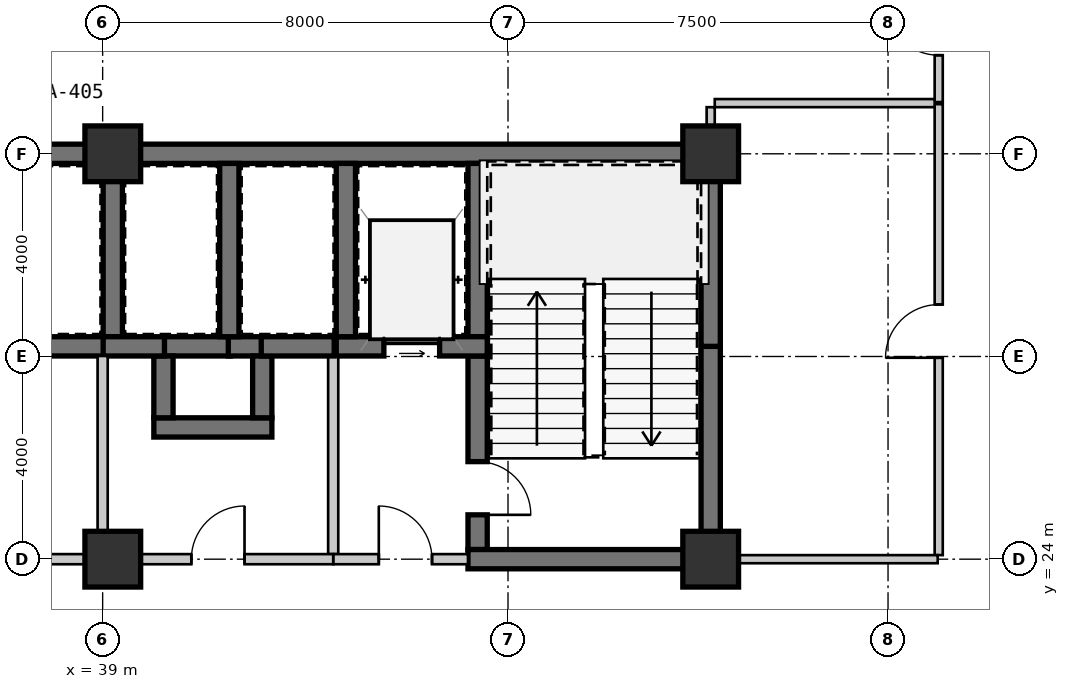
"""IFC4 building model, lengths in metres.
Left out: names, types, materials, properties, quantities, classifications, styles, units other than length and angle.
Written with IfcOpenShell. Run it as: python <this file> out.ifc"""

import sys

from ifc_helpers import new_model, si_unit, direction, frame, frame_2d, origin, origin_2d, place, context, subcontext, project, spatial, rectangle, extrude, source, transform, mapped, element, fill, save


model = new_model("IFC4")
c1 = context("Model", 3, precision=1e-05, world=origin(), true_north=direction((0.0, 1.0)))
c2 = subcontext(c1, "Body", "Model", "MODEL_VIEW")
j1 = project(units=[si_unit("LENGTHUNIT", "METRE"), si_unit("PLANEANGLEUNIT", "RADIAN")], contexts=[c1])
p1 = place(None, origin())
s1 = spatial("IfcSite", under=j1, at=p1, CompositionType="ELEMENT")
p2 = place(p1, origin())
s2 = spatial("IfcBuilding", under=s1, at=p2, CompositionType="ELEMENT")
p3 = place(p2, frame((0.0, 0.0, 8.4)))
s3 = spatial("IfcBuildingStorey", under=s2, at=p3, CompositionType="ELEMENT", Elevation=8.4)
m1 = source(origin(), c2, "Body", "SweptSolid", [
    extrude(rectangle(XDim=1.1, YDim=1.1, at=origin_2d()), origin(), (0.0, 0.0, 1.0), 4.55),
])
for number, where, z_axis, x_axis in (
    (1, (39.2, 24.0, 0.0), (0.0, 0.0, 1.0), (1.0, 0.0, 0.0)),
    (2, (51.0, 24.0, 0.0), (0.0, 0.0, 1.0), (1.0, 0.0, 0.0)),
    (3, (39.2, 32.0, 0.0), (0.0, 0.0, 1.0), (1.0, 0.0, 0.0)),
    (4, (51.0, 32.0, 0.0), (0.0, 0.0, 1.0), (1.0, 0.0, 0.0)),
):
    element("IfcColumn", number, at=place(p3, frame(where, z_axis=z_axis, x_axis=x_axis)), inside=s3, PredefinedType="COLUMN", context=c2, shape_type="MappedRepresentation", body=[
        mapped(m1, transform((0.0, 0.0, 0.0), scale=1.0)),
    ])
m2 = source(origin(), c2, "Body", "SweptSolid", [
    extrude(rectangle(XDim=11.2, YDim=0.38, at=frame_2d((5.6, 0.0))), origin(), (0.0, 0.0, 1.0), 4.29),
])
p4 = place(p3, frame((28.0, 32.0, 0.0), z_axis=(0.0, 0.0, 1.0), x_axis=(1.0, 0.0, 0.0)))
e5 = element("IfcWall", 5, at=p4, inside=s3, PredefinedType="SHEAR", context=c2, shape_type="MappedRepresentation", body=[
    mapped(m2, transform((0.0, 0.0, 0.0), scale=1.0)),
])
m3 = source(origin(), c2, "Body", "SweptSolid", [
    extrude(rectangle(XDim=11.99, YDim=0.38, at=frame_2d((5.995, 0.0))), origin(), (0.0, 0.0, 1.0), 4.29),
])
p5 = place(p3, frame((39.2, 32.0, 0.0), z_axis=(0.0, 0.0, 1.0), x_axis=(1.0, 0.0, 0.0)))
e6 = element("IfcWall", 6, at=p5, inside=s3, PredefinedType="SHEAR", context=c2, shape_type="MappedRepresentation", body=[
    mapped(m3, transform((0.0, 0.0, 0.0), scale=1.0)),
])
m4 = source(origin(), c2, "Body", "SweptSolid", [
    extrude(rectangle(XDim=4.01, YDim=0.38, at=frame_2d((2.005, 0.0))), origin(), (0.0, 0.0, 1.0), 4.29),
])
p6 = place(p3, frame((51.0, 24.19, 0.0), z_axis=(0.0, 0.0, 1.0), x_axis=(0.0, 1.0, 0.0)))
e7 = element("IfcWall", 7, at=p6, inside=s3, PredefinedType="SHEAR", context=c2, shape_type="MappedRepresentation", body=[
    mapped(m4, transform((0.0, 0.0, 0.0), scale=1.0)),
])
m5 = source(origin(), c2, "Body", "SweptSolid", [
    extrude(rectangle(XDim=3.61, YDim=0.38, at=frame_2d((1.805, 0.0))), origin(), (0.0, 0.0, 1.0), 4.29),
])
p7 = place(p3, frame((51.0, 28.2, 0.0), z_axis=(0.0, 0.0, 1.0), x_axis=(0.0, 1.0, 0.0)))
e8 = element("IfcWall", 8, at=p7, inside=s3, PredefinedType="SHEAR", context=c2, shape_type="MappedRepresentation", body=[
    mapped(m5, transform((0.0, 0.0, 0.0), scale=1.0)),
])
m6 = source(origin(), c2, "Body", "SweptSolid", [
    extrude(rectangle(XDim=3.42, YDim=0.38, at=frame_2d((1.71, 0.0))), origin(), (0.0, 0.0, 1.0), 4.29),
])
p8 = place(p3, frame((46.4, 31.81, 0.0), z_axis=(0.0, 0.0, 1.0), x_axis=(0.0, -1.0, 0.0)))
e9 = element("IfcWall", 9, at=p8, inside=s3, PredefinedType="SHEAR", context=c2, shape_type="MappedRepresentation", body=[
    mapped(m6, transform((0.0, 0.0, 0.0), scale=1.0)),
])
m7 = source(origin(), c2, "Body", "SweptSolid", [
    extrude(rectangle(XDim=3.82, YDim=0.38, at=frame_2d((1.91, 0.0))), origin(), (0.0, 0.0, 1.0), 4.29),
])
p9 = place(p3, frame((46.4, 28.01, 0.0), z_axis=(0.0, 0.0, 1.0), x_axis=(0.0, -1.0, 0.0)))
e10 = element("IfcWall", 10, at=p9, inside=s3, PredefinedType="SHEAR", context=c2, shape_type="MappedRepresentation", body=[
    mapped(m7, transform((0.0, 0.0, 0.0), scale=1.0)),
])
m8 = source(origin(), c2, "Body", "SweptSolid", [
    extrude(rectangle(XDim=1.05, YDim=2.1, at=frame_2d((0.525, 1.05))), frame((0.0, 0.2, 0.0), z_axis=(0.0, -1.0, 0.0), x_axis=(1.0, 0.0, 0.0)), (0.0, 0.0, 1.0), 0.4),
])
p10 = place(p9, frame((2.085, 0.0, 0.0)))
e11 = element("IfcOpeningElement", 11, at=p10, cuts=e10, PredefinedType="OPENING", context=c2, shape_type="MappedRepresentation", body=[
    mapped(m8, transform((0.0, 0.0, 0.0), scale=1.0)),
])
m9 = source(origin(), c2, "Body", "SweptSolid", [
    extrude(rectangle(XDim=4.98, YDim=0.38, at=frame_2d((2.49, 0.0))), origin(), (0.0, 0.0, 1.0), 4.29),
])
p11 = place(p3, frame((46.21, 24.0, 0.0), z_axis=(0.0, 0.0, 1.0), x_axis=(1.0, 0.0, 0.0)))
e12 = element("IfcWall", 12, at=p11, inside=s3, PredefinedType="SHEAR", context=c2, shape_type="MappedRepresentation", body=[
    mapped(m9, transform((0.0, 0.0, 0.0), scale=1.0)),
])
m10 = source(origin(), c2, "Body", "SweptSolid", [
    extrude(rectangle(XDim=2.98, YDim=0.38, at=frame_2d((1.49, 0.0))), origin(), (0.0, 0.0, 1.0), 4.29),
])
p12 = place(p3, frame((43.61, 28.2, 0.0), z_axis=(0.0, 0.0, 1.0), x_axis=(1.0, 0.0, 0.0)))
e13 = element("IfcWall", 13, at=p12, inside=s3, PredefinedType="SHEAR", context=c2, shape_type="MappedRepresentation", body=[
    mapped(m10, transform((0.0, 0.0, 0.0), scale=1.0)),
])
m11 = source(origin(), c2, "Body", "SweptSolid", [
    extrude(rectangle(XDim=1.1, YDim=2.15, at=frame_2d((0.55, 1.075))), frame((0.0, 0.2, 0.0), z_axis=(0.0, -1.0, 0.0), x_axis=(1.0, 0.0, 0.0)), (0.0, 0.0, 1.0), 0.4),
])
p13 = place(p12, frame((0.94, 0.0, 0.0)))
e14 = element("IfcOpeningElement", 14, at=p13, cuts=e13, PredefinedType="OPENING", context=c2, shape_type="MappedRepresentation", body=[
    mapped(m11, transform((0.0, 0.0, 0.0), scale=1.0)),
])
p14 = place(p3, frame((43.8, 31.81, 0.0), z_axis=(0.0, 0.0, 1.0), x_axis=(0.0, -1.0, 0.0)))
e15 = element("IfcWall", 15, at=p14, inside=s3, PredefinedType="SHEAR", context=c2, shape_type="MappedRepresentation", body=[
    mapped(m6, transform((0.0, 0.0, 0.0), scale=1.0)),
])
m12 = source(origin(), c2, "Body", "SweptSolid", [
    extrude(rectangle(XDim=3.91, YDim=0.2, at=frame_2d((1.955, 0.0))), origin(), (0.0, 0.0, 1.0), 4.29),
])
p15 = place(p3, frame((43.55, 28.01, 0.0), z_axis=(0.0, 0.0, 1.0), x_axis=(0.0, -1.0, 0.0)))
e16 = element("IfcWall", 16, at=p15, inside=s3, PredefinedType="SOLIDWALL", context=c2, shape_type="MappedRepresentation", body=[
    mapped(m12, transform((0.0, 0.0, 0.0), scale=1.0)),
])
m13 = source(origin(), c2, "Body", "SweptSolid", [
    extrude(rectangle(XDim=2.66, YDim=0.2, at=frame_2d((1.33, 0.0))), origin(), (0.0, 0.0, 1.0), 3.757),
])
p16 = place(p3, frame((43.55, 24.0, 0.0), z_axis=(0.0, 0.0, 1.0), x_axis=(1.0, 0.0, 0.0)))
e17 = element("IfcWall", 17, at=p16, inside=s3, PredefinedType="SOLIDWALL", context=c2, shape_type="MappedRepresentation", body=[
    mapped(m13, transform((0.0, 0.0, 0.0), scale=1.0)),
])
m14 = source(origin(), c2, "Body", "SweptSolid", [
    extrude(rectangle(XDim=1.05, YDim=2.1, at=frame_2d((0.525, 1.05))), frame((0.0, 0.11, 0.0), z_axis=(0.0, -1.0, 0.0), x_axis=(1.0, 0.0, 0.0)), (0.0, 0.0, 1.0), 0.22),
])
p17 = place(p16, frame((0.9, 0.0, 0.0)))
e18 = element("IfcOpeningElement", 18, at=p17, cuts=e17, PredefinedType="OPENING", context=c2, shape_type="MappedRepresentation", body=[
    mapped(m14, transform((0.0, 0.0, 0.0), scale=1.0)),
])
m15 = source(origin(), c2, "Body", "SweptSolid", [
    extrude(rectangle(XDim=1.32, YDim=0.38, at=frame_2d((0.66, 0.0))), origin(), (0.0, 0.0, 1.0), 4.29),
])
p18 = place(p3, frame((41.52, 28.2, 0.0), z_axis=(0.0, 0.0, 1.0), x_axis=(-1.0, 0.0, 0.0)))
e19 = element("IfcWall", 19, at=p18, inside=s3, PredefinedType="SHEAR", context=c2, shape_type="MappedRepresentation", body=[
    mapped(m15, transform((0.0, 0.0, 0.0), scale=1.0)),
])
m16 = source(origin(), c2, "Body", "SweptSolid", [
    extrude(rectangle(XDim=0.67, YDim=0.38, at=frame_2d((0.335, 0.0))), origin(), (0.0, 0.0, 1.0), 4.29),
])
p19 = place(p3, frame((42.15, 28.2, 0.0), z_axis=(0.0, 0.0, 1.0), x_axis=(-1.0, 0.0, 0.0)))
e20 = element("IfcWall", 20, at=p19, inside=s3, PredefinedType="SHEAR", context=c2, shape_type="MappedRepresentation", body=[
    mapped(m16, transform((0.0, 0.0, 0.0), scale=1.0)),
])
m17 = source(origin(), c2, "Body", "SweptSolid", [
    extrude(rectangle(XDim=2.33, YDim=0.38, at=frame_2d((1.165, 0.0))), origin(), (0.0, 0.0, 1.0), 4.29),
])
p20 = place(p3, frame((40.01, 26.6, 0.0), z_axis=(0.0, 0.0, 1.0), x_axis=(1.0, 0.0, 0.0)))
e21 = element("IfcWall", 21, at=p20, inside=s3, PredefinedType="SHEAR", context=c2, shape_type="MappedRepresentation", body=[
    mapped(m17, transform((0.0, 0.0, 0.0), scale=1.0)),
])
m18 = source(origin(), c2, "Body", "SweptSolid", [
    extrude(rectangle(XDim=1.22, YDim=0.38, at=frame_2d((0.61, 0.0))), origin(), (0.0, 0.0, 1.0), 4.29),
])
for number, where, z_axis, x_axis in (
    (22, (40.2, 28.01, 0.0), (0.0, 0.0, 1.0), (0.0, -1.0, 0.0)),
    (23, (42.15, 26.79, 0.0), (0.0, 0.0, 1.0), (0.0, 1.0, 0.0)),
):
    element("IfcWall", number, at=place(p3, frame(where, z_axis=z_axis, x_axis=x_axis)), inside=s3, PredefinedType="SHEAR", context=c2, shape_type="MappedRepresentation", body=[
        mapped(m18, transform((0.0, 0.0, 0.0), scale=1.0)),
    ])
p21 = place(p3, frame((39.2, 28.39, 0.0), z_axis=(0.0, 0.0, 1.0), x_axis=(0.0, 1.0, 0.0)))
e24 = element("IfcWall", 24, at=p21, inside=s3, PredefinedType="SHEAR", context=c2, shape_type="MappedRepresentation", body=[
    mapped(m6, transform((0.0, 0.0, 0.0), scale=1.0)),
])
m19 = source(origin(), c2, "Body", "SweptSolid", [
    extrude(rectangle(XDim=2.36, YDim=0.38, at=frame_2d((1.18, 0.0))), origin(), (0.0, 0.0, 1.0), 4.29),
])
p22 = place(p3, frame((36.66, 28.2, 0.0), z_axis=(0.0, 0.0, 1.0), x_axis=(1.0, 0.0, 0.0)))
e25 = element("IfcWall", 25, at=p22, inside=s3, PredefinedType="SHEAR", context=c2, shape_type="MappedRepresentation", body=[
    mapped(m19, transform((0.0, 0.0, 0.0), scale=1.0)),
])
p23 = place(p3, frame((41.5, 28.39, 0.0), z_axis=(0.0, 0.0, 1.0), x_axis=(0.0, 1.0, 0.0)))
e26 = element("IfcWall", 26, at=p23, inside=s3, PredefinedType="SHEAR", context=c2, shape_type="MappedRepresentation", body=[
    mapped(m6, transform((0.0, 0.0, 0.0), scale=1.0)),
])
m20 = source(origin(), c2, "Body", "SweptSolid", [
    extrude(rectangle(XDim=1.21, YDim=0.38, at=frame_2d((0.605, 0.0))), origin(), (0.0, 0.0, 1.0), 4.29),
])
p24 = place(p3, frame((39.01, 28.2, 0.0), z_axis=(0.0, 0.0, 1.0), x_axis=(1.0, 0.0, 0.0)))
e27 = element("IfcWall", 27, at=p24, inside=s3, PredefinedType="SHEAR", context=c2, shape_type="MappedRepresentation", body=[
    mapped(m20, transform((0.0, 0.0, 0.0), scale=1.0)),
])
m21 = source(origin(), c2, "Body", "SweptSolid", [
    extrude(rectangle(XDim=1.44, YDim=0.38, at=frame_2d((0.72, 0.0))), origin(), (0.0, 0.0, 1.0), 4.29),
])
p25 = place(p3, frame((42.13, 28.2, 0.0), z_axis=(0.0, 0.0, 1.0), x_axis=(1.0, 0.0, 0.0)))
e28 = element("IfcWall", 28, at=p25, inside=s3, PredefinedType="SHEAR", context=c2, shape_type="MappedRepresentation", body=[
    mapped(m21, transform((0.0, 0.0, 0.0), scale=1.0)),
])
p26 = place(p3, frame((39.0, 28.01, 0.0), z_axis=(0.0, 0.0, 1.0), x_axis=(0.0, -1.0, 0.0)))
e29 = element("IfcWall", 29, at=p26, inside=s3, PredefinedType="SOLIDWALL", context=c2, shape_type="MappedRepresentation", body=[
    mapped(m12, transform((0.0, 0.0, 0.0), scale=1.0)),
])
m22 = source(origin(), c2, "Body", "SweptSolid", [
    extrude(rectangle(XDim=3.85, YDim=0.2, at=frame_2d((1.925, 0.0))), origin(), (0.0, 0.0, 1.0), 3.83),
])
p27 = place(p3, frame((39.0, 24.0, 0.0), z_axis=(0.0, 0.0, 1.0), x_axis=(-1.0, 0.0, 0.0)))
e30 = element("IfcWall", 30, at=p27, inside=s3, PredefinedType="SOLIDWALL", context=c2, shape_type="MappedRepresentation", body=[
    mapped(m22, transform((0.0, 0.0, 0.0), scale=1.0)),
])
p28 = place(p27, frame((1.4, 0.0, 0.0)))
e31 = element("IfcOpeningElement", 31, at=p28, cuts=e30, PredefinedType="OPENING", context=c2, shape_type="MappedRepresentation", body=[
    mapped(m14, transform((0.0, 0.0, 0.0), scale=1.0)),
])
m23 = source(origin(), c2, "Body", "SweptSolid", [
    extrude(rectangle(XDim=4.55, YDim=0.2, at=frame_2d((2.275, 0.0))), origin(), (0.0, 0.0, 1.0), 3.757),
])
p29 = place(p3, frame((43.55, 24.0, 0.0), z_axis=(0.0, 0.0, 1.0), x_axis=(-1.0, 0.0, 0.0)))
e32 = element("IfcWall", 32, at=p29, inside=s3, PredefinedType="SOLIDWALL", context=c2, shape_type="MappedRepresentation", body=[
    mapped(m23, transform((0.0, 0.0, 0.0), scale=1.0)),
])
p30 = place(p29, frame((1.75, 0.0, 0.0)))
e33 = element("IfcOpeningElement", 33, at=p30, cuts=e32, PredefinedType="OPENING", context=c2, shape_type="MappedRepresentation", body=[
    mapped(m14, transform((0.0, 0.0, 0.0), scale=1.0)),
])
m24 = source(origin(), c2, "Body", "SweptSolid", [
    extrude(rectangle(XDim=8.9, YDim=0.16, at=frame_2d((4.45, 0.0))), origin(), (0.0, 0.0, 1.0), 4.29),
])
p31 = place(p3, frame((55.5, 24.08, 0.0), z_axis=(0.0, 0.0, 1.0), x_axis=(0.0, 1.0, 0.0)))
e34 = element("IfcWall", 34, at=p31, inside=s3, PredefinedType="PARTITIONING", context=c2, shape_type="MappedRepresentation", body=[
    mapped(m24, transform((0.0, 0.0, 0.0), scale=1.0)),
])
m25 = source(origin(), c2, "Body", "SweptSolid", [
    extrude(rectangle(XDim=1.05, YDim=2.1, at=frame_2d((0.525, 1.05))), frame((0.0, 0.09, 0.0), z_axis=(0.0, -1.0, 0.0), x_axis=(1.0, 0.0, 0.0)), (0.0, 0.0, 1.0), 0.18),
])
p32 = place(p31, frame((3.895, 0.0, 0.0)))
e35 = element("IfcOpeningElement", 35, at=p32, cuts=e34, PredefinedType="OPENING", context=c2, shape_type="MappedRepresentation", body=[
    mapped(m25, transform((0.0, 0.0, 0.0), scale=1.0)),
])
m26 = source(origin(), c2, "Body", "SweptSolid", [
    extrude(rectangle(XDim=4.29, YDim=0.16, at=frame_2d((2.145, 0.0))), origin(), (0.0, 0.0, 1.0), 4.29),
])
p33 = place(p3, frame((51.19, 24.0, 0.0), z_axis=(0.0, 0.0, 1.0), x_axis=(1.0, 0.0, 0.0)))
e36 = element("IfcWall", 36, at=p33, inside=s3, PredefinedType="PARTITIONING", context=c2, shape_type="MappedRepresentation", body=[
    mapped(m26, transform((0.0, 0.0, 0.0), scale=1.0)),
])
m27 = source(origin(), c2, "Body", "SweptSolid", [
    extrude(rectangle(XDim=2.9, YDim=0.16, at=frame_2d((1.45, 0.0))), origin(), (0.0, 0.0, 1.0), 4.29),
])
p34 = place(p3, frame((55.5, 33.02, 0.0), z_axis=(0.0, 0.0, 1.0), x_axis=(0.0, 1.0, 0.0)))
e37 = element("IfcWall", 37, at=p34, inside=s3, PredefinedType="PARTITIONING", context=c2, shape_type="MappedRepresentation", body=[
    mapped(m27, transform((0.0, 0.0, 0.0), scale=1.0)),
])
p35 = place(p34, frame((0.925, 0.0, 0.0)))
e38 = element("IfcOpeningElement", 38, at=p35, cuts=e37, PredefinedType="OPENING", context=c2, shape_type="MappedRepresentation", body=[
    mapped(m25, transform((0.0, 0.0, 0.0), scale=1.0)),
])
m28 = source(origin(), c2, "Body", "SweptSolid", [
    extrude(rectangle(XDim=4.34, YDim=0.16, at=frame_2d((2.17, 0.0))), origin(), (0.0, 0.0, 1.0), 4.29),
])
p36 = place(p3, frame((51.08, 33.0, 0.0), z_axis=(0.0, 0.0, 1.0), x_axis=(1.0, 0.0, 0.0)))
e39 = element("IfcWall", 39, at=p36, inside=s3, PredefinedType="PARTITIONING", context=c2, shape_type="MappedRepresentation", body=[
    mapped(m28, transform((0.0, 0.0, 0.0), scale=1.0)),
])
m29 = source(origin(), c2, "Body", "SweptSolid", [
    extrude(rectangle(XDim=0.73, YDim=0.16, at=frame_2d((0.365, 0.0))), origin(), (0.0, 0.0, 1.0), 4.29),
])
p37 = place(p3, frame((51.0, 32.19, 0.0), z_axis=(0.0, 0.0, 1.0), x_axis=(0.0, 1.0, 0.0)))
e40 = element("IfcWall", 40, at=p37, inside=s3, PredefinedType="PARTITIONING", context=c2, shape_type="MappedRepresentation", body=[
    mapped(m29, transform((0.0, 0.0, 0.0), scale=1.0)),
])
m30 = source(origin(), c2, "Body", "SweptSolid", [
    extrude(rectangle(XDim=1.05, YDim=2.1, at=frame_2d((0.525, 1.05))), frame((0.0, 0.025, 0.0), z_axis=(0.0, -1.0, 0.0), x_axis=(1.0, 0.0, 0.0)), (0.0, 0.0, 1.0), 0.05),
])
p38 = place(p10, origin())
e41 = element("IfcDoor", 41, at=p38, inside=s3, OperationType="SINGLE_SWING_RIGHT", PredefinedType="DOOR", context=c2, shape_type="MappedRepresentation", body=[
    mapped(m30, transform((0.0, 0.0, 0.0), scale=1.0)),
])
fill(e11, e41)
m31 = source(origin(), c2, "Body", "SweptSolid", [
    extrude(rectangle(XDim=1.1, YDim=2.15, at=frame_2d((0.55, 1.075))), frame((0.0, 0.025, 0.0), z_axis=(0.0, -1.0, 0.0), x_axis=(1.0, 0.0, 0.0)), (0.0, 0.0, 1.0), 0.05),
])
p39 = place(p13, origin())
e42 = element("IfcDoor", 42, at=p39, inside=s3, OperationType="SLIDING_TO_LEFT", PredefinedType="DOOR", context=c2, shape_type="MappedRepresentation", body=[
    mapped(m31, transform((0.0, 0.0, 0.0), scale=1.0)),
])
fill(e14, e42)
p40 = place(p17, origin())
e43 = element("IfcDoor", 43, at=p40, inside=s3, OperationType="SINGLE_SWING_LEFT", PredefinedType="DOOR", context=c2, shape_type="MappedRepresentation", body=[
    mapped(m30, transform((0.0, 0.0, 0.0), scale=1.0)),
])
fill(e18, e43)
p41 = place(p30, frame((1.05, 0.0, 0.0), z_axis=(0.0, 0.0, 1.0), x_axis=(-1.0, 0.0, 0.0)))
e44 = element("IfcDoor", 44, at=p41, inside=s3, OperationType="SINGLE_SWING_RIGHT", PredefinedType="DOOR", context=c2, shape_type="MappedRepresentation", body=[
    mapped(m30, transform((0.0, 0.0, 0.0), scale=1.0)),
])
fill(e33, e44)
p42 = place(p32, origin())
e45 = element("IfcDoor", 45, at=p42, inside=s3, OperationType="SINGLE_SWING_LEFT", PredefinedType="DOOR", context=c2, shape_type="MappedRepresentation", body=[
    mapped(m30, transform((0.0, 0.0, 0.0), scale=1.0)),
])
fill(e35, e45)
p43 = place(p35, origin())
e46 = element("IfcDoor", 46, at=p43, inside=s3, OperationType="SINGLE_SWING_RIGHT", PredefinedType="DOOR", context=c2, shape_type="MappedRepresentation", body=[
    mapped(m30, transform((0.0, 0.0, 0.0), scale=1.0)),
])
fill(e38, e46)
save(model, sys.argv[1])
